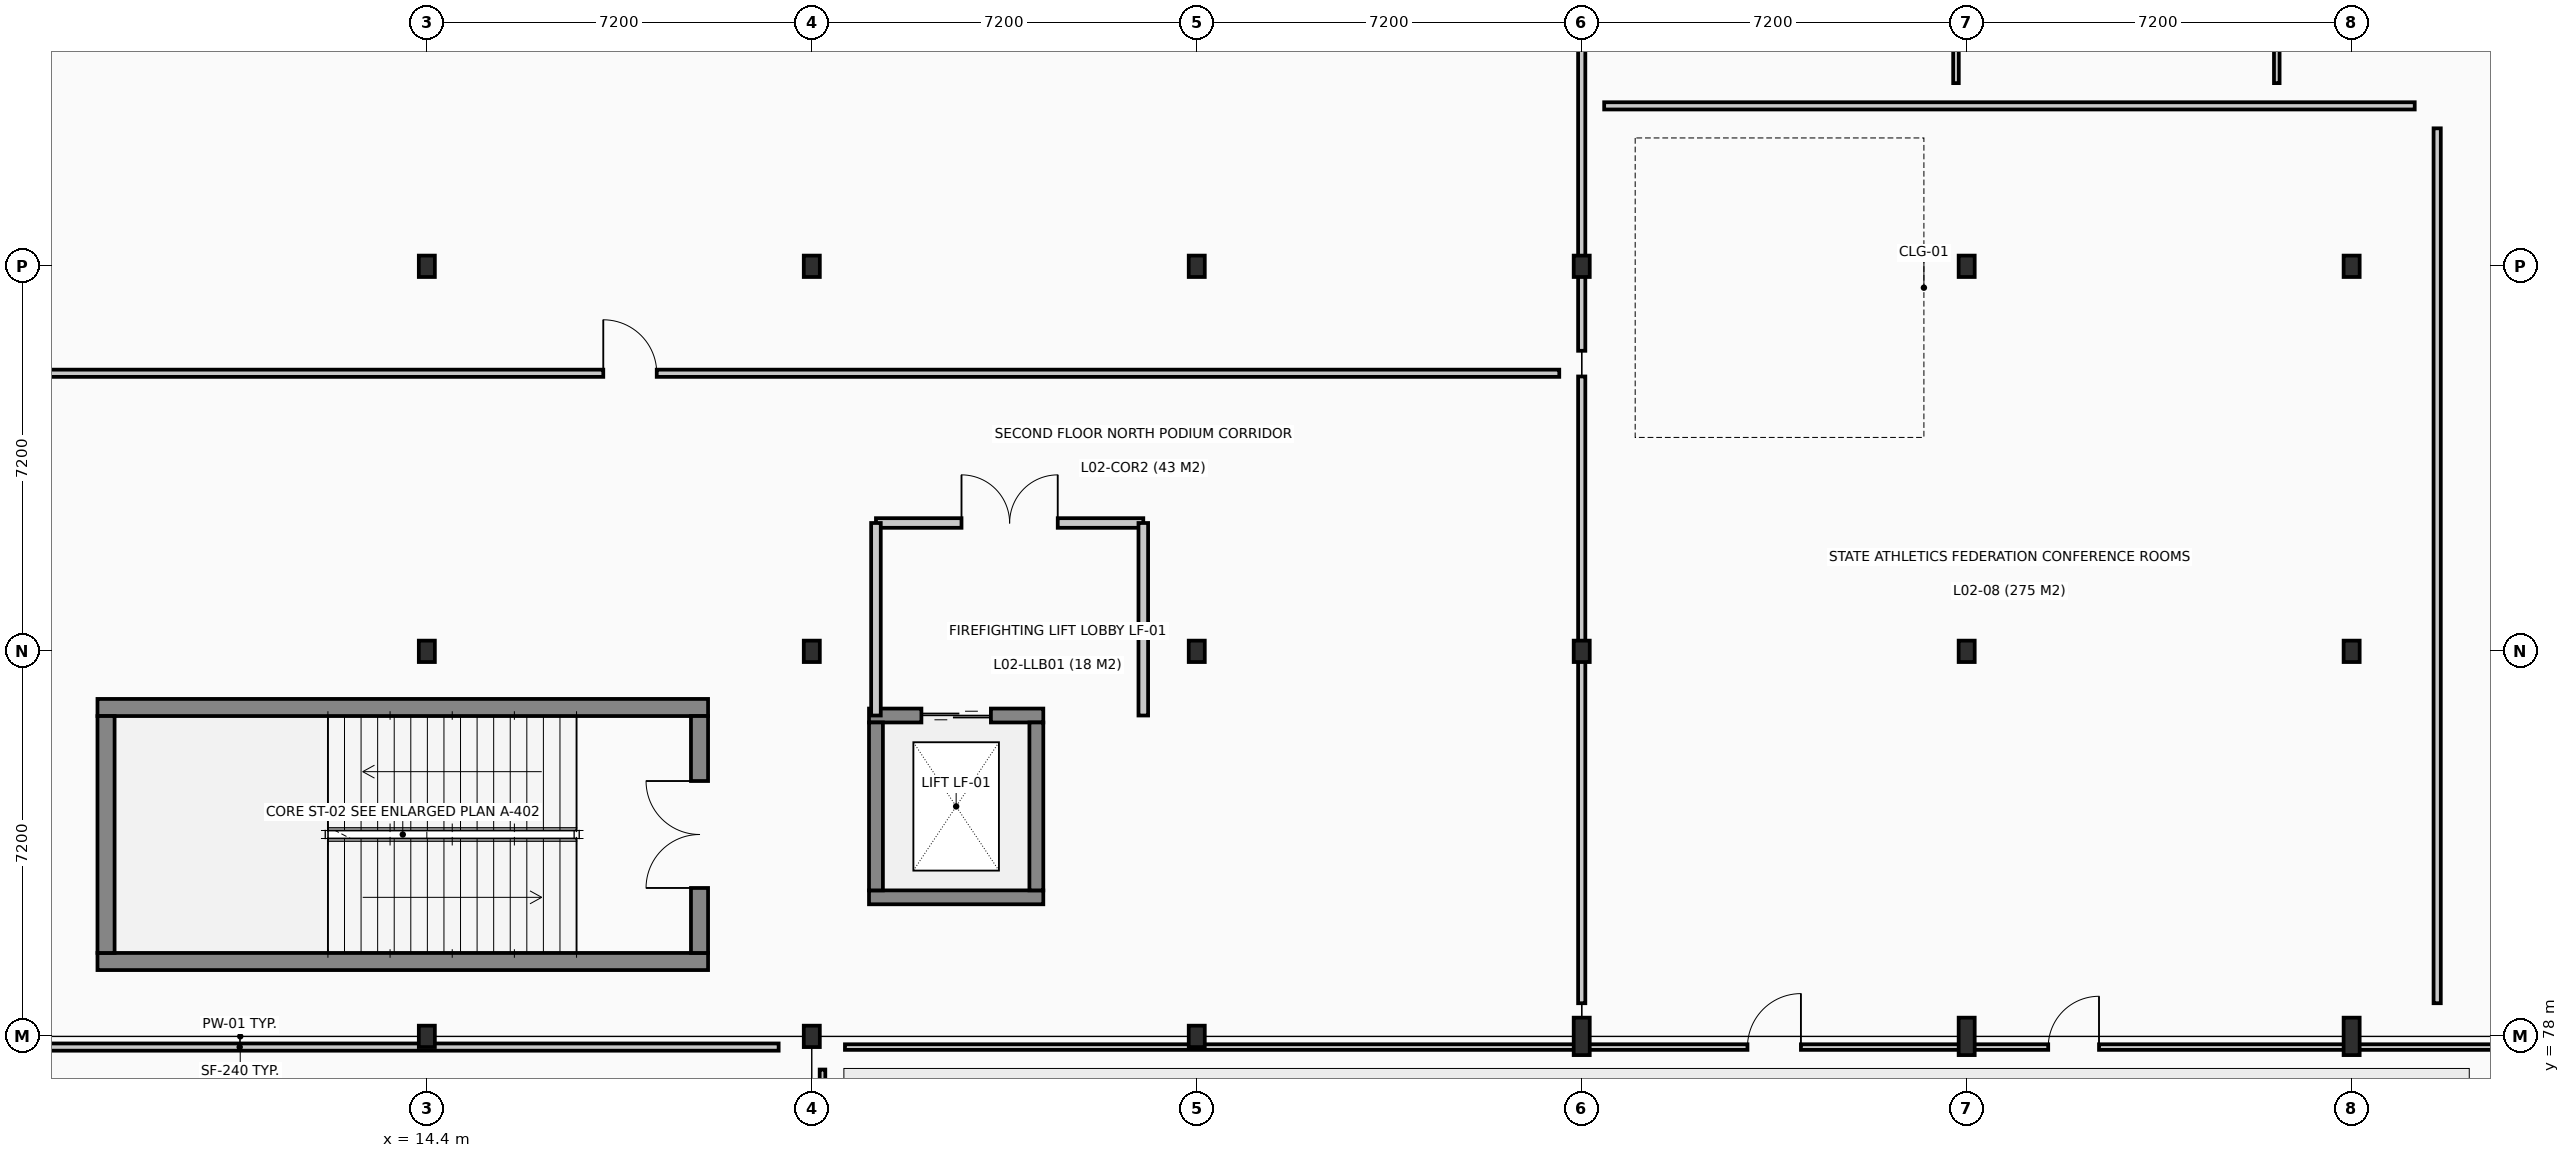
"""IFC4 building model, lengths in metres.
Left out: names, types, materials, properties, quantities, classifications, styles, units other than length and angle.
Written with IfcOpenShell. Run it as: python <this file> out.ifc"""

import sys

from ifc_helpers import new_model, si_unit, direction, frame, frame_2d, origin, origin_2d, place, context, subcontext, project, spatial, rectangle, i_section, extrude, element, fill, save


model = new_model("IFC4")
c1 = context("Model", 3, precision=1e-05, world=origin(), true_north=direction((0.0, 1.0)))
c2 = subcontext(c1, "Body", "Model", "MODEL_VIEW")
j1 = project(units=[si_unit("LENGTHUNIT", "METRE"), si_unit("PLANEANGLEUNIT", "RADIAN")], contexts=[c1])
p1 = place(None, origin())
s1 = spatial("IfcSite", under=j1, at=p1, CompositionType="ELEMENT")
p2 = place(p1, origin())
s2 = spatial("IfcBuilding", under=s1, at=p2, CompositionType="ELEMENT")
p3 = place(p2, frame((0.0, 0.0, 9.6)))
s3 = spatial("IfcBuildingStorey", under=s2, at=p3, CompositionType="ELEMENT", Elevation=9.6)
for number, where, z_axis, x_axis in (
    (1, (14.4, 78.0, 0.0), (0.0, 0.0, 1.0), (1.0, 0.0, 0.0)),
    (2, (14.4, 85.2, 0.0), (0.0, 0.0, 1.0), (1.0, 0.0, 0.0)),
    (3, (14.4, 92.4, 0.0), (0.0, 0.0, 1.0), (1.0, 0.0, 0.0)),
    (4, (21.6, 78.0, 0.0), (0.0, 0.0, 1.0), (1.0, 0.0, 0.0)),
    (5, (21.6, 85.2, 0.0), (0.0, 0.0, 1.0), (1.0, 0.0, 0.0)),
    (6, (21.6, 92.4, 0.0), (0.0, 0.0, 1.0), (1.0, 0.0, 0.0)),
    (7, (28.8, 78.0, 0.0), (0.0, 0.0, 1.0), (1.0, 0.0, 0.0)),
    (8, (28.8, 85.2, 0.0), (0.0, 0.0, 1.0), (1.0, 0.0, 0.0)),
    (9, (28.8, 92.4, 0.0), (0.0, 0.0, 1.0), (1.0, 0.0, 0.0)),
):
    element("IfcColumn", number, at=place(p3, frame(where, z_axis=z_axis, x_axis=x_axis)), inside=s3, PredefinedType="COLUMN", context=c2, shape_type="SweptSolid", body=[
        extrude(i_section(OverallWidth=0.3, OverallDepth=0.4, WebThickness=0.013, FlangeThickness=0.024, at=origin_2d()), origin(), (0.0, 0.0, 1.0), 4.8),
    ])
p4 = place(p3, frame((36.0, 78.0, 0.0), z_axis=(0.0, 0.0, 1.0), x_axis=(1.0, 0.0, 0.0)))
e10 = element("IfcColumn", 10, at=p4, inside=s3, PredefinedType="COLUMN", context=c2, shape_type="SweptSolid", body=[
    extrude(i_section(OverallWidth=0.3, OverallDepth=0.7, WebThickness=0.017, FlangeThickness=0.032, at=origin_2d()), origin(), (0.0, 0.0, 1.0), 4.8),
])
for number, where, z_axis, x_axis in (
    (11, (36.0, 85.2, 0.0), (0.0, 0.0, 1.0), (1.0, 0.0, 0.0)),
    (12, (36.0, 92.4, 0.0), (0.0, 0.0, 1.0), (1.0, 0.0, 0.0)),
):
    element("IfcColumn", number, at=place(p3, frame(where, z_axis=z_axis, x_axis=x_axis)), inside=s3, PredefinedType="COLUMN", context=c2, shape_type="SweptSolid", body=[
        extrude(i_section(OverallWidth=0.3, OverallDepth=0.4, WebThickness=0.013, FlangeThickness=0.024, at=origin_2d()), origin(), (0.0, 0.0, 1.0), 4.8),
    ])
p5 = place(p3, frame((43.2, 78.0, 0.0), z_axis=(0.0, 0.0, 1.0), x_axis=(1.0, 0.0, 0.0)))
e13 = element("IfcColumn", 13, at=p5, inside=s3, PredefinedType="COLUMN", context=c2, shape_type="SweptSolid", body=[
    extrude(i_section(OverallWidth=0.3, OverallDepth=0.7, WebThickness=0.017, FlangeThickness=0.032, at=origin_2d()), origin(), (0.0, 0.0, 1.0), 4.8),
])
for number, where, z_axis, x_axis in (
    (14, (43.2, 85.2, 0.0), (0.0, 0.0, 1.0), (1.0, 0.0, 0.0)),
    (15, (43.2, 92.4, 0.0), (0.0, 0.0, 1.0), (1.0, 0.0, 0.0)),
):
    element("IfcColumn", number, at=place(p3, frame(where, z_axis=z_axis, x_axis=x_axis)), inside=s3, PredefinedType="COLUMN", context=c2, shape_type="SweptSolid", body=[
        extrude(i_section(OverallWidth=0.3, OverallDepth=0.4, WebThickness=0.013, FlangeThickness=0.024, at=origin_2d()), origin(), (0.0, 0.0, 1.0), 4.8),
    ])
p6 = place(p3, frame((50.4, 78.0, 0.0), z_axis=(0.0, 0.0, 1.0), x_axis=(1.0, 0.0, 0.0)))
e16 = element("IfcColumn", 16, at=p6, inside=s3, PredefinedType="COLUMN", context=c2, shape_type="SweptSolid", body=[
    extrude(i_section(OverallWidth=0.3, OverallDepth=0.7, WebThickness=0.017, FlangeThickness=0.032, at=origin_2d()), origin(), (0.0, 0.0, 1.0), 4.8),
])
for number, where, z_axis, x_axis in (
    (17, (50.4, 85.2, 0.0), (0.0, 0.0, 1.0), (1.0, 0.0, 0.0)),
    (18, (50.4, 92.4, 0.0), (0.0, 0.0, 1.0), (1.0, 0.0, 0.0)),
):
    element("IfcColumn", number, at=place(p3, frame(where, z_axis=z_axis, x_axis=x_axis)), inside=s3, PredefinedType="COLUMN", context=c2, shape_type="SweptSolid", body=[
        extrude(i_section(OverallWidth=0.3, OverallDepth=0.4, WebThickness=0.013, FlangeThickness=0.024, at=origin_2d()), origin(), (0.0, 0.0, 1.0), 4.8),
    ])
for number, where, z_axis, x_axis in (
    (19, (8.24, 79.4, 0.0), (0.0, 0.0, 1.0), (1.0, 0.0, 0.0)),
    (20, (8.24, 84.15, 0.0), (0.0, 0.0, 1.0), (1.0, 0.0, 0.0)),
):
    element("IfcWall", number, at=place(p3, frame(where, z_axis=z_axis, x_axis=x_axis)), inside=s3, PredefinedType="SHEAR", context=c2, shape_type="SweptSolid", body=[
        extrude(rectangle(XDim=11.42, YDim=0.32, at=frame_2d((5.71, 0.0))), origin(), (0.0, 0.0, 1.0), 4.56),
    ])
p7 = place(p3, frame((8.4, 79.56, 0.0), z_axis=(0.0, 0.0, 1.0), x_axis=(0.0, 1.0, 0.0)))
e21 = element("IfcWall", 21, at=p7, inside=s3, PredefinedType="SHEAR", context=c2, shape_type="SweptSolid", body=[
    extrude(rectangle(XDim=4.43, YDim=0.32, at=frame_2d((2.215, 0.0))), origin(), (0.0, 0.0, 1.0), 4.56),
])
p8 = place(p3, frame((19.5, 79.56, 0.0), z_axis=(0.0, 0.0, 1.0), x_axis=(0.0, 1.0, 0.0)))
e22 = element("IfcWall", 22, at=p8, inside=s3, PredefinedType="SHEAR", context=c2, shape_type="SweptSolid", body=[
    extrude(rectangle(XDim=4.43, YDim=0.32, at=frame_2d((2.215, 0.0))), origin(), (0.0, 0.0, 1.0), 4.56),
])
p9 = place(p8, frame((1.215, 0.0, 0.0)))
e23 = element("IfcOpeningElement", 23, at=p9, cuts=e22, PredefinedType="OPENING", context=c2, shape_type="SweptSolid", body=[
    extrude(rectangle(XDim=2.0, YDim=2.15, at=frame_2d((1.0, 1.075))), frame((0.0, 0.17, 0.0), z_axis=(0.0, -1.0, 0.0), x_axis=(1.0, 0.0, 0.0)), (0.0, 0.0, 1.0), 0.34),
])
p10 = place(p3, frame((22.67, 80.6, 0.0), z_axis=(0.0, 0.0, 1.0), x_axis=(1.0, 0.0, 0.0)))
e24 = element("IfcWall", 24, at=p10, inside=s3, PredefinedType="SHEAR", context=c2, shape_type="SweptSolid", body=[
    extrude(rectangle(XDim=3.26, YDim=0.26, at=frame_2d((1.63, 0.0))), origin(), (0.0, 0.0, 1.0), 4.56),
])
p11 = place(p3, frame((22.67, 84.0, 0.0), z_axis=(0.0, 0.0, 1.0), x_axis=(1.0, 0.0, 0.0)))
e25 = element("IfcWall", 25, at=p11, inside=s3, PredefinedType="SHEAR", context=c2, shape_type="SweptSolid", body=[
    extrude(rectangle(XDim=3.26, YDim=0.26, at=frame_2d((1.63, 0.0))), origin(), (0.0, 0.0, 1.0), 4.56),
])
p12 = place(p11, frame((0.98, 0.0, 0.0)))
e26 = element("IfcOpeningElement", 26, at=p12, cuts=e25, PredefinedType="OPENING", context=c2, shape_type="SweptSolid", body=[
    extrude(rectangle(XDim=1.3, YDim=2.2, at=frame_2d((0.65, 1.1))), frame((0.0, 0.14, 0.0), z_axis=(0.0, -1.0, 0.0), x_axis=(1.0, 0.0, 0.0)), (0.0, 0.0, 1.0), 0.28),
])
for number, where, z_axis, x_axis in (
    (27, (22.8, 80.73, 0.0), (0.0, 0.0, 1.0), (0.0, 1.0, 0.0)),
    (28, (25.8, 80.73, 0.0), (0.0, 0.0, 1.0), (0.0, 1.0, 0.0)),
):
    element("IfcWall", number, at=place(p3, frame(where, z_axis=z_axis, x_axis=x_axis)), inside=s3, PredefinedType="SHEAR", context=c2, shape_type="SweptSolid", body=[
        extrude(rectangle(XDim=3.14, YDim=0.26, at=frame_2d((1.57, 0.0))), origin(), (0.0, 0.0, 1.0), 4.56),
    ])
p13 = place(p3, frame((22.8, 87.6, 0.0), z_axis=(0.0, 0.0, 1.0), x_axis=(1.0, 0.0, 0.0)))
e29 = element("IfcWall", 29, at=p13, inside=s3, PredefinedType="PARTITIONING", context=c2, shape_type="SweptSolid", body=[
    extrude(rectangle(XDim=5.0, YDim=0.18, at=frame_2d((2.5, 0.0))), origin(), (0.0, 0.0, 1.0), 4.24),
])
p14 = place(p13, frame((1.6, 0.0, 0.0)))
e30 = element("IfcOpeningElement", 30, at=p14, cuts=e29, PredefinedType="OPENING", context=c2, shape_type="SweptSolid", body=[
    extrude(rectangle(XDim=1.8, YDim=2.15, at=frame_2d((0.9, 1.075))), frame((0.0, 0.1, 0.0), z_axis=(0.0, -1.0, 0.0), x_axis=(1.0, 0.0, 0.0)), (0.0, 0.0, 1.0), 0.2),
])
for number, where, z_axis, x_axis in (
    (31, (22.8, 84.0, 0.0), (0.0, 0.0, 1.0), (0.0, 1.0, 0.0)),
    (32, (27.8, 84.0, 0.0), (0.0, 0.0, 1.0), (0.0, 1.0, 0.0)),
):
    element("IfcWall", number, at=place(p3, frame(where, z_axis=z_axis, x_axis=x_axis)), inside=s3, PredefinedType="PARTITIONING", context=c2, shape_type="SweptSolid", body=[
        extrude(rectangle(XDim=3.6, YDim=0.18, at=frame_2d((1.8, 0.0))), origin(), (0.0, 0.0, 1.0), 4.545),
    ])
p15 = place(p3, frame((22.22, 77.8, 0.0), z_axis=(0.0, 0.0, 1.0), x_axis=(1.0, 0.0, 0.0)))
e33 = element("IfcWall", 33, at=p15, inside=s3, PredefinedType="PARTITIONING", context=c2, shape_type="SweptSolid", body=[
    extrude(rectangle(XDim=34.76, YDim=0.105, at=frame_2d((17.38, 0.0))), origin(), (0.0, 0.0, 1.0), 4.04),
])
p16 = place(p15, frame((16.88, 0.0, 0.0)))
e34 = element("IfcOpeningElement", 34, at=p16, cuts=e33, PredefinedType="OPENING", context=c2, shape_type="SweptSolid", body=[
    extrude(rectangle(XDim=1.0, YDim=2.1, at=frame_2d((0.5, 1.05))), frame((0.0, 0.062, 0.0), z_axis=(0.0, -1.0, 0.0), x_axis=(1.0, 0.0, 0.0)), (0.0, 0.0, 1.0), 0.125),
])
p17 = place(p15, frame((22.505, 0.0, 0.0)))
e35 = element("IfcOpeningElement", 35, at=p17, cuts=e33, PredefinedType="OPENING", context=c2, shape_type="SweptSolid", body=[
    extrude(rectangle(XDim=0.95, YDim=2.1, at=frame_2d((0.475, 1.05))), frame((0.0, 0.062, 0.0), z_axis=(0.0, -1.0, 0.0), x_axis=(1.0, 0.0, 0.0)), (0.0, 0.0, 1.0), 0.125),
])
p18 = place(p3, frame((21.8, 49.82, 0.0), z_axis=(0.0, 0.0, 1.0), x_axis=(0.0, 1.0, 0.0)))
e36 = element("IfcWall", 36, at=p18, inside=s3, PredefinedType="PARTITIONING", context=c2, shape_type="SweptSolid", body=[
    extrude(rectangle(XDim=27.56, YDim=0.105, at=frame_2d((13.78, 0.0))), origin(), (0.0, 0.0, 1.0), 4.09),
])
p19 = place(p3, frame((0.82, 77.8, 0.0), z_axis=(0.0, 0.0, 1.0), x_axis=(1.0, 0.0, 0.0)))
e37 = element("IfcWall", 37, at=p19, inside=s3, PredefinedType="PARTITIONING", context=c2, shape_type="SweptSolid", body=[
    extrude(rectangle(XDim=20.16, YDim=0.135, at=frame_2d((10.08, 0.0))), origin(), (0.0, 0.0, 1.0), 4.04),
])
p20 = place(p3, frame((0.82, 90.4, 0.0), z_axis=(0.0, 0.0, 1.0), x_axis=(1.0, 0.0, 0.0)))
e38 = element("IfcWall", 38, at=p20, inside=s3, PredefinedType="PARTITIONING", context=c2, shape_type="SweptSolid", body=[
    extrude(rectangle(XDim=34.76, YDim=0.135, at=frame_2d((17.38, 0.0))), origin(), (0.0, 0.0, 1.0), 4.545),
])
p21 = place(p20, frame((16.88, 0.0, 0.0)))
e39 = element("IfcOpeningElement", 39, at=p21, cuts=e38, PredefinedType="OPENING", context=c2, shape_type="SweptSolid", body=[
    extrude(rectangle(XDim=1.0, YDim=2.1, at=frame_2d((0.5, 1.05))), frame((0.0, 0.077, 0.0), z_axis=(0.0, -1.0, 0.0), x_axis=(1.0, 0.0, 0.0)), (0.0, 0.0, 1.0), 0.155),
])
p22 = place(p3, frame((36.0, 90.82, 0.0), z_axis=(0.0, 0.0, 1.0), x_axis=(0.0, 1.0, 0.0)))
e40 = element("IfcWall", 40, at=p22, inside=s3, PredefinedType="PARTITIONING", context=c2, shape_type="SweptSolid", body=[
    extrude(rectangle(XDim=18.76, YDim=0.135, at=frame_2d((9.38, 0.0))), origin(), (0.0, 0.0, 1.0), 3.89),
])
p23 = place(p3, frame((36.42, 95.4, 0.0), z_axis=(0.0, 0.0, 1.0), x_axis=(1.0, 0.0, 0.0)))
e41 = element("IfcWall", 41, at=p23, inside=s3, PredefinedType="PARTITIONING", context=c2, shape_type="SweptSolid", body=[
    extrude(rectangle(XDim=15.16, YDim=0.135, at=frame_2d((7.58, 0.0))), origin(), (0.0, 0.0, 1.0), 4.545),
])
p24 = place(p3, frame((36.0, 78.62, 0.0), z_axis=(0.0, 0.0, 1.0), x_axis=(0.0, 1.0, 0.0)))
e42 = element("IfcWall", 42, at=p24, inside=s3, PredefinedType="PARTITIONING", context=c2, shape_type="SweptSolid", body=[
    extrude(rectangle(XDim=11.72, YDim=0.135, at=frame_2d((5.86, 0.0))), origin(), (0.0, 0.0, 1.0), 4.09),
])
p25 = place(p3, frame((52.0, 78.62, 0.0), z_axis=(0.0, 0.0, 1.0), x_axis=(0.0, 1.0, 0.0)))
e43 = element("IfcWall", 43, at=p25, inside=s3, PredefinedType="PARTITIONING", context=c2, shape_type="SweptSolid", body=[
    extrude(rectangle(XDim=16.36, YDim=0.135, at=frame_2d((8.18, 0.0))), origin(), (0.0, 0.0, 1.0), 4.545),
])
p26 = place(p3, frame((43.0, 95.825, 0.0), z_axis=(0.0, 0.0, 1.0), x_axis=(0.0, 1.0, 0.0)))
e44 = element("IfcWall", 44, at=p26, inside=s3, PredefinedType="PARTITIONING", context=c2, shape_type="SweptSolid", body=[
    extrude(rectangle(XDim=5.755, YDim=0.105, at=frame_2d((2.877, 0.0))), origin(), (0.0, 0.0, 1.0), 3.89),
])
p27 = place(p3, frame((49.0, 95.825, 0.0), z_axis=(0.0, 0.0, 1.0), x_axis=(0.0, 1.0, 0.0)))
e45 = element("IfcWall", 45, at=p27, inside=s3, PredefinedType="PARTITIONING", context=c2, shape_type="SweptSolid", body=[
    extrude(rectangle(XDim=5.755, YDim=0.105, at=frame_2d((2.877, 0.0))), origin(), (0.0, 0.0, 1.0), 4.545),
])
p28 = place(p9, origin())
e46 = element("IfcDoor", 46, at=p28, inside=s3, OperationType="DOUBLE_DOOR_SINGLE_SWING", PredefinedType="DOOR", context=c2, shape_type="SweptSolid", body=[
    extrude(rectangle(XDim=2.0, YDim=2.15, at=frame_2d((1.0, 1.075))), frame((0.0, 0.025, 0.0), z_axis=(0.0, -1.0, 0.0), x_axis=(1.0, 0.0, 0.0)), (0.0, 0.0, 1.0), 0.05),
])
fill(e23, e46)
p29 = place(p12, origin())
e47 = element("IfcDoor", 47, at=p29, inside=s3, OperationType="DOUBLE_DOOR_SLIDING", PredefinedType="DOOR", context=c2, shape_type="SweptSolid", body=[
    extrude(rectangle(XDim=1.3, YDim=2.2, at=frame_2d((0.65, 1.1))), frame((0.0, 0.025, 0.0), z_axis=(0.0, -1.0, 0.0), x_axis=(1.0, 0.0, 0.0)), (0.0, 0.0, 1.0), 0.05),
])
fill(e26, e47)
p30 = place(p14, origin())
e48 = element("IfcDoor", 48, at=p30, inside=s3, OperationType="DOUBLE_DOOR_SINGLE_SWING", PredefinedType="DOOR", context=c2, shape_type="SweptSolid", body=[
    extrude(rectangle(XDim=1.8, YDim=2.15, at=frame_2d((0.9, 1.075))), frame((0.0, 0.025, 0.0), z_axis=(0.0, -1.0, 0.0), x_axis=(1.0, 0.0, 0.0)), (0.0, 0.0, 1.0), 0.05),
])
fill(e30, e48)
p31 = place(p16, frame((1.0, 0.0, 0.0), z_axis=(0.0, 0.0, 1.0), x_axis=(-1.0, 0.0, 0.0)))
e49 = element("IfcDoor", 49, at=p31, inside=s3, OperationType="SINGLE_SWING_LEFT", PredefinedType="DOOR", context=c2, shape_type="SweptSolid", body=[
    extrude(rectangle(XDim=1.0, YDim=2.1, at=frame_2d((0.5, 1.05))), frame((0.0, 0.025, 0.0), z_axis=(0.0, -1.0, 0.0), x_axis=(1.0, 0.0, 0.0)), (0.0, 0.0, 1.0), 0.05),
])
fill(e34, e49)
p32 = place(p21, origin())
e50 = element("IfcDoor", 50, at=p32, inside=s3, OperationType="SINGLE_SWING_LEFT", PredefinedType="DOOR", context=c2, shape_type="SweptSolid", body=[
    extrude(rectangle(XDim=1.0, YDim=2.1, at=frame_2d((0.5, 1.05))), frame((0.0, 0.025, 0.0), z_axis=(0.0, -1.0, 0.0), x_axis=(1.0, 0.0, 0.0)), (0.0, 0.0, 1.0), 0.05),
])
fill(e39, e50)
p33 = place(p17, origin())
e51 = element("IfcDoor", 51, at=p33, inside=s3, OperationType="SINGLE_SWING_RIGHT", PredefinedType="DOOR", context=c2, shape_type="SweptSolid", body=[
    extrude(rectangle(XDim=0.95, YDim=2.1, at=frame_2d((0.475, 1.05))), frame((0.0, 0.025, 0.0), z_axis=(0.0, -1.0, 0.0), x_axis=(1.0, 0.0, 0.0)), (0.0, 0.0, 1.0), 0.05),
])
fill(e35, e51)
save(model, sys.argv[1])
